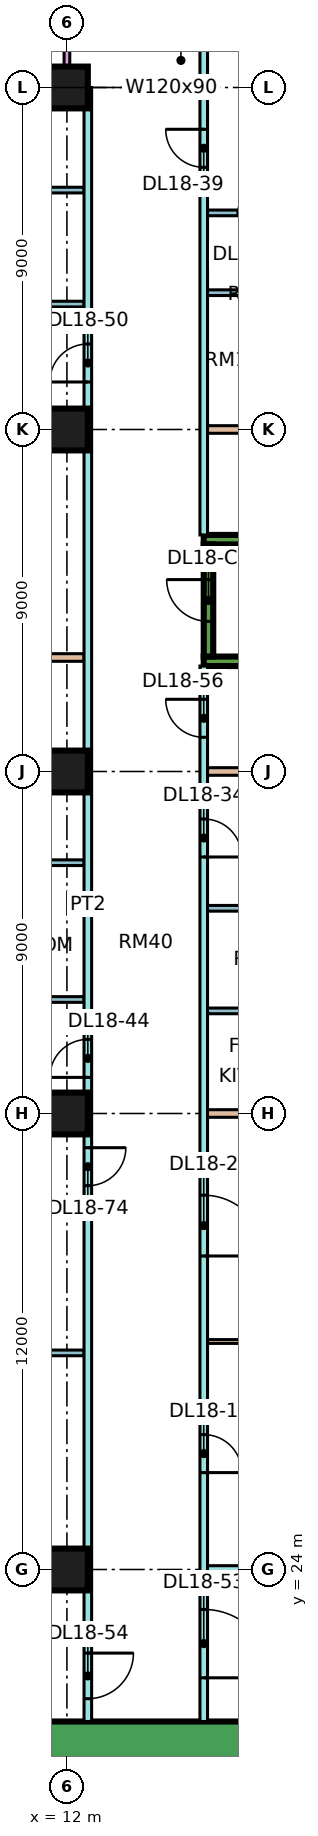
"""IFC4 building model, lengths in metres.
Left out: names, types, materials, properties, quantities, classifications, styles, units other than length and angle.
Written with IfcOpenShell. Run it as: python <this file> out.ifc"""

import sys

from ifc_helpers import new_model, si_unit, direction, frame, frame_2d, origin, origin_2d, place, context, subcontext, project, spatial, rectangle, extrude, element, fill, save


model = new_model("IFC4")
c1 = context("Model", 3, precision=1e-05, world=origin(), true_north=direction((0.0, 1.0)))
c2 = subcontext(c1, "Body", "Model", "MODEL_VIEW")
j1 = project(units=[si_unit("LENGTHUNIT", "METRE"), si_unit("PLANEANGLEUNIT", "RADIAN")], contexts=[c1])
p1 = place(None, origin())
s1 = spatial("IfcSite", under=j1, at=p1, CompositionType="ELEMENT")
p2 = place(p1, origin())
s2 = spatial("IfcBuilding", under=s1, at=p2, CompositionType="ELEMENT")
p3 = place(p2, frame((0.0, 0.0, 82.65)))
s3 = spatial("IfcBuildingStorey", under=s2, at=p3, CompositionType="ELEMENT", Elevation=82.65)
for number, where, z_axis, x_axis in (
    (1, (12.0, 24.0, 0.0), (0.0, 0.0, 1.0), (1.0, 0.0, 0.0)),
    (2, (12.0, 36.0, 0.0), (0.0, 0.0, 1.0), (1.0, 0.0, 0.0)),
    (3, (12.0, 45.0, 0.0), (0.0, 0.0, 1.0), (1.0, 0.0, 0.0)),
    (4, (12.0, 54.0, 0.0), (0.0, 0.0, 1.0), (1.0, 0.0, 0.0)),
    (5, (12.0, 63.0, 0.0), (0.0, 0.0, 1.0), (1.0, 0.0, 0.0)),
):
    element("IfcColumn", number, at=place(p3, frame(where, z_axis=z_axis, x_axis=x_axis)), inside=s3, PredefinedType="COLUMN", context=c2, shape_type="SweptSolid", body=[
        extrude(rectangle(XDim=1.1, YDim=1.1, at=origin_2d()), origin(), (0.0, 0.0, 1.0), 3.75),
    ])
p4 = place(p3, frame((9.0, 19.45, 0.0), z_axis=(0.0, 0.0, 1.0), x_axis=(1.0, 0.0, 0.0)))
e6 = element("IfcWall", 6, at=p4, inside=s3, PredefinedType="SHEAR", context=c2, shape_type="SweptSolid", body=[
    extrude(rectangle(XDim=25.0, YDim=1.1, at=frame_2d((12.5, 0.0))), origin(), (0.0, 0.0, 1.0), 3.75),
])
p5 = place(p4, frame((19.1, 0.0, 0.0)))
e7 = element("IfcOpeningElement", 7, at=p5, cuts=e6, PredefinedType="OPENING", context=c2, shape_type="SweptSolid", body=[
    extrude(rectangle(XDim=1.8, YDim=2.4, at=frame_2d((0.9, 1.2))), frame((0.0, 0.56, 0.0), z_axis=(0.0, -1.0, 0.0), x_axis=(1.0, 0.0, 0.0)), (0.0, 0.0, 1.0), 1.12),
])
for number, where, z_axis, x_axis in (
    (8, (15.6, 47.9, 0.0), (0.0, 0.0, 1.0), (1.0, 0.0, 0.0)),
    (9, (15.6, 51.1, 0.0), (0.0, 0.0, 1.0), (1.0, 0.0, 0.0)),
):
    element("IfcWall", number, at=place(p3, frame(where, z_axis=z_axis, x_axis=x_axis)), inside=s3, PredefinedType="SHEAR", context=c2, shape_type="SweptSolid", body=[
        extrude(rectangle(XDim=7.0, YDim=0.25, at=frame_2d((3.5, 0.0))), origin(), (0.0, 0.0, 1.0), 3.75),
    ])
p6 = place(p3, frame((15.725, 48.025, 0.0), z_axis=(0.0, 0.0, 1.0), x_axis=(0.0, 1.0, 0.0)))
e10 = element("IfcWall", 10, at=p6, inside=s3, PredefinedType="SHEAR", context=c2, shape_type="SweptSolid", body=[
    extrude(rectangle(XDim=2.95, YDim=0.25, at=frame_2d((1.475, 0.0))), origin(), (0.0, 0.0, 1.0), 3.75),
])
p7 = place(p6, frame((0.925, 0.0, 0.0)))
e11 = element("IfcOpeningElement", 11, at=p7, cuts=e10, PredefinedType="OPENING", context=c2, shape_type="SweptSolid", body=[
    extrude(rectangle(XDim=1.1, YDim=2.2, at=frame_2d((0.55, 1.1))), frame((0.0, 0.135, 0.0), z_axis=(0.0, -1.0, 0.0), x_axis=(1.0, 0.0, 0.0)), (0.0, 0.0, 1.0), 0.27),
])
p8 = place(p3, frame((11.925, 63.0, 0.0), z_axis=(0.0, 0.0, 1.0), x_axis=(-1.0, 0.0, 0.0)))
e12 = element("IfcWall", 12, at=p8, inside=s3, PredefinedType="SOLIDWALL", context=c2, shape_type="SweptSolid", body=[
    extrude(rectangle(XDim=10.35, YDim=0.15, at=frame_2d((5.175, 0.0))), origin(), (0.0, 0.0, 1.0), 3.3),
])
p9 = place(p8, frame((1.775, 0.0, 1.7)))
e13 = element("IfcOpeningElement", 13, at=p9, cuts=e12, PredefinedType="OPENING", context=c2, shape_type="SweptSolid", body=[
    extrude(rectangle(XDim=1.2, YDim=0.9, at=frame_2d((0.6, 0.45))), frame((0.0, 0.085, 0.0), z_axis=(0.0, -1.0, 0.0), x_axis=(1.0, 0.0, 0.0)), (0.0, 0.0, 1.0), 0.17),
])
p10 = place(p8, frame((6.962, 0.0, 0.0)))
e14 = element("IfcOpeningElement", 14, at=p10, cuts=e12, PredefinedType="OPENING", context=c2, shape_type="SweptSolid", body=[
    extrude(rectangle(XDim=1.8, YDim=2.4, at=frame_2d((0.9, 1.2))), frame((0.0, 0.085, 0.0), z_axis=(0.0, -1.0, 0.0), x_axis=(1.0, 0.0, 0.0)), (0.0, 0.0, 1.0), 0.17),
])
p11 = place(p3, frame((12.0, 64.5, 0.0), z_axis=(0.0, 0.0, 1.0), x_axis=(0.0, -1.0, 0.0)))
e15 = element("IfcWall", 15, at=p11, inside=s3, PredefinedType="SOLIDWALL", context=c2, shape_type="SweptSolid", body=[
    extrude(rectangle(XDim=1.5, YDim=0.15, at=frame_2d((0.75, 0.0))), origin(), (0.0, 0.0, 1.0), 3.3),
])
p12 = place(p3, frame((-1.35, 22.4, 0.0), z_axis=(0.0, 0.0, 1.0), x_axis=(1.0, 0.0, 0.0)))
e16 = element("IfcWall", 16, at=p12, inside=s3, PredefinedType="PARTITIONING", context=c2, shape_type="SweptSolid", body=[
    extrude(rectangle(XDim=13.8, YDim=0.2, at=frame_2d((6.9, 0.0))), origin(), (0.0, 0.0, 1.0), 3.3),
])
p13 = place(p3, frame((0.0, 36.0, 0.0), z_axis=(0.0, 0.0, 1.0), x_axis=(1.0, 0.0, 0.0)))
e17 = element("IfcWall", 17, at=p13, inside=s3, PredefinedType="PARTITIONING", context=c2, shape_type="SweptSolid", body=[
    extrude(rectangle(XDim=12.45, YDim=0.2, at=frame_2d((6.225, 0.0))), origin(), (0.0, 0.0, 1.0), 3.3),
])
p14 = place(p3, frame((0.0, 48.0, 0.0), z_axis=(0.0, 0.0, 1.0), x_axis=(1.0, 0.0, 0.0)))
e18 = element("IfcWall", 18, at=p14, inside=s3, PredefinedType="PARTITIONING", context=c2, shape_type="SweptSolid", body=[
    extrude(rectangle(XDim=12.45, YDim=0.2, at=frame_2d((6.225, 0.0))), origin(), (0.0, 0.0, 1.0), 3.3),
])
for number, where, z_axis, x_axis in (
    (19, (7.225, 29.7, 0.0), (0.0, 0.0, 1.0), (1.0, 0.0, 0.0)),
    (20, (7.225, 33.3, 0.0), (0.0, 0.0, 1.0), (1.0, 0.0, 0.0)),
):
    element("IfcWall", number, at=place(p3, frame(where, z_axis=z_axis, x_axis=x_axis)), inside=s3, PredefinedType="PARTITIONING", context=c2, shape_type="SweptSolid", body=[
        extrude(rectangle(XDim=5.225, YDim=0.15, at=frame_2d((2.612, 0.0))), origin(), (0.0, 0.0, 1.0), 3.3),
    ])
p15 = place(p3, frame((7.8, 54.3, 0.0), z_axis=(0.0, 0.0, 1.0), x_axis=(1.0, 0.0, 0.0)))
e21 = element("IfcWall", 21, at=p15, inside=s3, PredefinedType="PARTITIONING", context=c2, shape_type="SweptSolid", body=[
    extrude(rectangle(XDim=4.65, YDim=0.1, at=frame_2d((2.325, 0.0))), origin(), (0.0, 0.0, 1.0), 3.3),
])
for number, where, z_axis, x_axis in (
    (22, (7.825, 57.3, 0.0), (0.0, 0.0, 1.0), (1.0, 0.0, 0.0)),
    (23, (7.825, 60.3, 0.0), (0.0, 0.0, 1.0), (1.0, 0.0, 0.0)),
):
    element("IfcWall", number, at=place(p3, frame(where, z_axis=z_axis, x_axis=x_axis)), inside=s3, PredefinedType="PARTITIONING", context=c2, shape_type="SweptSolid", body=[
        extrude(rectangle(XDim=4.625, YDim=0.15, at=frame_2d((2.312, 0.0))), origin(), (0.0, 0.0, 1.0), 3.3),
    ])
p16 = place(p3, frame((8.425, 39.0, 0.0), z_axis=(0.0, 0.0, 1.0), x_axis=(1.0, 0.0, 0.0)))
e24 = element("IfcWall", 24, at=p16, inside=s3, PredefinedType="PARTITIONING", context=c2, shape_type="SweptSolid", body=[
    extrude(rectangle(XDim=4.025, YDim=0.15, at=frame_2d((2.012, 0.0))), origin(), (0.0, 0.0, 1.0), 3.3),
])
p17 = place(p16, frame((1.675, 0.0, 0.0)))
e25 = element("IfcOpeningElement", 25, at=p17, cuts=e24, PredefinedType="OPENING", context=c2, shape_type="SweptSolid", body=[
    extrude(rectangle(XDim=0.8, YDim=2.1, at=frame_2d((0.4, 1.05))), frame((0.0, 0.085, 0.0), z_axis=(0.0, -1.0, 0.0), x_axis=(1.0, 0.0, 0.0)), (0.0, 0.0, 1.0), 0.17),
])
p18 = place(p3, frame((8.425, 42.6, 0.0), z_axis=(0.0, 0.0, 1.0), x_axis=(1.0, 0.0, 0.0)))
e26 = element("IfcWall", 26, at=p18, inside=s3, PredefinedType="PARTITIONING", context=c2, shape_type="SweptSolid", body=[
    extrude(rectangle(XDim=4.025, YDim=0.15, at=frame_2d((2.012, 0.0))), origin(), (0.0, 0.0, 1.0), 3.3),
])
p19 = place(p3, frame((12.55, 20.0, 0.0), z_axis=(0.0, 0.0, 1.0), x_axis=(0.0, 1.0, 0.0)))
e27 = element("IfcWall", 27, at=p19, inside=s3, PredefinedType="PARTITIONING", context=c2, shape_type="SweptSolid", body=[
    extrude(rectangle(XDim=43.0, YDim=0.2, at=frame_2d((21.5, 0.0))), origin(), (0.0, 0.0, 1.0), 3.3),
])
p20 = place(p19, frame((16.95, 0.0, 0.0)))
e28 = element("IfcOpeningElement", 28, at=p20, cuts=e27, PredefinedType="OPENING", context=c2, shape_type="SweptSolid", body=[
    extrude(rectangle(XDim=1.0, YDim=2.1, at=frame_2d((0.5, 1.05))), frame((0.0, 0.11, 0.0), z_axis=(0.0, -1.0, 0.0), x_axis=(1.0, 0.0, 0.0)), (0.0, 0.0, 1.0), 0.22),
])
p21 = place(p19, frame((35.25, 0.0, 0.0)))
e29 = element("IfcOpeningElement", 29, at=p21, cuts=e27, PredefinedType="OPENING", context=c2, shape_type="SweptSolid", body=[
    extrude(rectangle(XDim=1.0, YDim=2.1, at=frame_2d((0.5, 1.05))), frame((0.0, 0.11, 0.0), z_axis=(0.0, -1.0, 0.0), x_axis=(1.0, 0.0, 0.0)), (0.0, 0.0, 1.0), 0.22),
])
p22 = place(p19, frame((0.6, 0.0, 0.0)))
e30 = element("IfcOpeningElement", 30, at=p22, cuts=e27, PredefinedType="OPENING", context=c2, shape_type="SweptSolid", body=[
    extrude(rectangle(XDim=1.2, YDim=2.1, at=frame_2d((0.6, 1.05))), frame((0.0, 0.11, 0.0), z_axis=(0.0, -1.0, 0.0), x_axis=(1.0, 0.0, 0.0)), (0.0, 0.0, 1.0), 0.22),
])
p23 = place(p19, frame((14.1, 0.0, 0.0)))
e31 = element("IfcOpeningElement", 31, at=p23, cuts=e27, PredefinedType="OPENING", context=c2, shape_type="SweptSolid", body=[
    extrude(rectangle(XDim=1.0, YDim=2.1, at=frame_2d((0.5, 1.05))), frame((0.0, 0.11, 0.0), z_axis=(0.0, -1.0, 0.0), x_axis=(1.0, 0.0, 0.0)), (0.0, 0.0, 1.0), 0.22),
])
p24 = place(p3, frame((15.6, 20.0, 0.0), z_axis=(0.0, 0.0, 1.0), x_axis=(0.0, 1.0, 0.0)))
e32 = element("IfcWall", 32, at=p24, inside=s3, PredefinedType="PARTITIONING", context=c2, shape_type="SweptSolid", body=[
    extrude(rectangle(XDim=27.775, YDim=0.2, at=frame_2d((13.887, 0.0))), origin(), (0.0, 0.0, 1.0), 3.3),
])
p25 = place(p24, frame((6.55, 0.0, 0.0)))
e33 = element("IfcOpeningElement", 33, at=p25, cuts=e32, PredefinedType="OPENING", context=c2, shape_type="SweptSolid", body=[
    extrude(rectangle(XDim=1.0, YDim=2.1, at=frame_2d((0.5, 1.05))), frame((0.0, 0.11, 0.0), z_axis=(0.0, -1.0, 0.0), x_axis=(1.0, 0.0, 0.0)), (0.0, 0.0, 1.0), 0.22),
])
p26 = place(p24, frame((12.25, 0.0, 0.0)))
e34 = element("IfcOpeningElement", 34, at=p26, cuts=e32, PredefinedType="OPENING", context=c2, shape_type="SweptSolid", body=[
    extrude(rectangle(XDim=1.6, YDim=2.1, at=frame_2d((0.8, 1.05))), frame((0.0, 0.11, 0.0), z_axis=(0.0, -1.0, 0.0), x_axis=(1.0, 0.0, 0.0)), (0.0, 0.0, 1.0), 0.22),
])
p27 = place(p24, frame((22.75, 0.0, 0.0)))
e35 = element("IfcOpeningElement", 35, at=p27, cuts=e32, PredefinedType="OPENING", context=c2, shape_type="SweptSolid", body=[
    extrude(rectangle(XDim=1.0, YDim=2.1, at=frame_2d((0.5, 1.05))), frame((0.0, 0.11, 0.0), z_axis=(0.0, -1.0, 0.0), x_axis=(1.0, 0.0, 0.0)), (0.0, 0.0, 1.0), 0.22),
])
p28 = place(p24, frame((1.15, 0.0, 0.0)))
e36 = element("IfcOpeningElement", 36, at=p28, cuts=e32, PredefinedType="OPENING", context=c2, shape_type="SweptSolid", body=[
    extrude(rectangle(XDim=1.8, YDim=2.1, at=frame_2d((0.9, 1.05))), frame((0.0, 0.11, 0.0), z_axis=(0.0, -1.0, 0.0), x_axis=(1.0, 0.0, 0.0)), (0.0, 0.0, 1.0), 0.22),
])
p29 = place(p24, frame((25.9, 0.0, 0.0)))
e37 = element("IfcOpeningElement", 37, at=p29, cuts=e32, PredefinedType="OPENING", context=c2, shape_type="SweptSolid", body=[
    extrude(rectangle(XDim=1.0, YDim=2.1, at=frame_2d((0.5, 1.05))), frame((0.0, 0.11, 0.0), z_axis=(0.0, -1.0, 0.0), x_axis=(1.0, 0.0, 0.0)), (0.0, 0.0, 1.0), 0.22),
])
p30 = place(p3, frame((15.6, 51.225, 0.0), z_axis=(0.0, 0.0, 1.0), x_axis=(0.0, 1.0, 0.0)))
e38 = element("IfcWall", 38, at=p30, inside=s3, PredefinedType="PARTITIONING", context=c2, shape_type="SweptSolid", body=[
    extrude(rectangle(XDim=13.125, YDim=0.2, at=frame_2d((6.562, 0.0))), origin(), (0.0, 0.0, 1.0), 3.3),
])
p31 = place(p30, frame((9.675, 0.0, 0.0)))
e39 = element("IfcOpeningElement", 39, at=p31, cuts=e38, PredefinedType="OPENING", context=c2, shape_type="SweptSolid", body=[
    extrude(rectangle(XDim=1.0, YDim=2.1, at=frame_2d((0.5, 1.05))), frame((0.0, 0.11, 0.0), z_axis=(0.0, -1.0, 0.0), x_axis=(1.0, 0.0, 0.0)), (0.0, 0.0, 1.0), 0.22),
])
p32 = place(p3, frame((15.7, 24.0, 0.0), z_axis=(0.0, 0.0, 1.0), x_axis=(1.0, 0.0, 0.0)))
e40 = element("IfcWall", 40, at=p32, inside=s3, PredefinedType="PARTITIONING", context=c2, shape_type="SweptSolid", body=[
    extrude(rectangle(XDim=5.8, YDim=0.2, at=frame_2d((2.9, 0.0))), origin(), (0.0, 0.0, 1.0), 3.3),
])
p33 = place(p3, frame((15.7, 30.0, 0.0), z_axis=(0.0, 0.0, 1.0), x_axis=(1.0, 0.0, 0.0)))
e41 = element("IfcWall", 41, at=p33, inside=s3, PredefinedType="PARTITIONING", context=c2, shape_type="SweptSolid", body=[
    extrude(rectangle(XDim=5.8, YDim=0.1, at=frame_2d((2.9, 0.0))), origin(), (0.0, 0.0, 1.0), 3.3),
])
p34 = place(p3, frame((15.7, 36.0, 0.0), z_axis=(0.0, 0.0, 1.0), x_axis=(1.0, 0.0, 0.0)))
e42 = element("IfcWall", 42, at=p34, inside=s3, PredefinedType="PARTITIONING", context=c2, shape_type="SweptSolid", body=[
    extrude(rectangle(XDim=8.3, YDim=0.2, at=frame_2d((4.15, 0.0))), origin(), (0.0, 0.0, 1.0), 3.3),
])
for number, where, z_axis, x_axis in (
    (43, (15.7, 38.7, 0.0), (0.0, 0.0, 1.0), (1.0, 0.0, 0.0)),
    (44, (15.7, 41.4, 0.0), (0.0, 0.0, 1.0), (1.0, 0.0, 0.0)),
):
    element("IfcWall", number, at=place(p3, frame(where, z_axis=z_axis, x_axis=x_axis)), inside=s3, PredefinedType="PARTITIONING", context=c2, shape_type="SweptSolid", body=[
        extrude(rectangle(XDim=2.825, YDim=0.15, at=frame_2d((1.413, 0.0))), origin(), (0.0, 0.0, 1.0), 3.3),
    ])
p35 = place(p3, frame((15.7, 45.0, 0.0), z_axis=(0.0, 0.0, 1.0), x_axis=(1.0, 0.0, 0.0)))
e45 = element("IfcWall", 45, at=p35, inside=s3, PredefinedType="PARTITIONING", context=c2, shape_type="SweptSolid", body=[
    extrude(rectangle(XDim=8.3, YDim=0.2, at=frame_2d((4.15, 0.0))), origin(), (0.0, 0.0, 1.0), 3.3),
])
p36 = place(p3, frame((15.7, 54.0, 0.0), z_axis=(0.0, 0.0, 1.0), x_axis=(1.0, 0.0, 0.0)))
e46 = element("IfcWall", 46, at=p36, inside=s3, PredefinedType="PARTITIONING", context=c2, shape_type="SweptSolid", body=[
    extrude(rectangle(XDim=8.226, YDim=0.2, at=frame_2d((4.113, 0.0))), origin(), (0.0, 0.0, 1.0), 3.3),
])
p37 = place(p3, frame((15.7, 57.6, 0.0), z_axis=(0.0, 0.0, 1.0), x_axis=(1.0, 0.0, 0.0)))
e47 = element("IfcWall", 47, at=p37, inside=s3, PredefinedType="PARTITIONING", context=c2, shape_type="SweptSolid", body=[
    extrude(rectangle(XDim=2.525, YDim=0.15, at=frame_2d((1.263, 0.0))), origin(), (0.0, 0.0, 1.0), 3.3),
])
p38 = place(p3, frame((15.7, 59.7, 0.0), z_axis=(0.0, 0.0, 1.0), x_axis=(1.0, 0.0, 0.0)))
e48 = element("IfcWall", 48, at=p38, inside=s3, PredefinedType="PARTITIONING", context=c2, shape_type="SweptSolid", body=[
    extrude(rectangle(XDim=2.525, YDim=0.15, at=frame_2d((1.263, 0.0))), origin(), (0.0, 0.0, 1.0), 3.3),
])
p39 = place(p38, frame((0.8, 0.0, 0.0)))
e49 = element("IfcOpeningElement", 49, at=p39, cuts=e48, PredefinedType="OPENING", context=c2, shape_type="SweptSolid", body=[
    extrude(rectangle(XDim=0.8, YDim=2.1, at=frame_2d((0.4, 1.05))), frame((0.0, 0.085, 0.0), z_axis=(0.0, -1.0, 0.0), x_axis=(1.0, 0.0, 0.0)), (0.0, 0.0, 1.0), 0.17),
])
p40 = place(p7, frame((1.1, 0.0, 0.0), z_axis=(0.0, 0.0, 1.0), x_axis=(-1.0, 0.0, 0.0)))
e50 = element("IfcDoor", 50, at=p40, inside=s3, OperationType="SINGLE_SWING_RIGHT", PredefinedType="DOOR", context=c2, shape_type="SweptSolid", body=[
    extrude(rectangle(XDim=1.1, YDim=2.2, at=frame_2d((0.55, 1.1))), frame((0.0, 0.025, 0.0), z_axis=(0.0, -1.0, 0.0), x_axis=(1.0, 0.0, 0.0)), (0.0, 0.0, 1.0), 0.05),
])
fill(e11, e50)
p41 = place(p25, frame((1.0, 0.0, 0.0), z_axis=(0.0, 0.0, 1.0), x_axis=(-1.0, 0.0, 0.0)))
e51 = element("IfcDoor", 51, at=p41, inside=s3, OperationType="SINGLE_SWING_LEFT", PredefinedType="DOOR", context=c2, shape_type="SweptSolid", body=[
    extrude(rectangle(XDim=1.0, YDim=2.1, at=frame_2d((0.5, 1.05))), frame((0.0, 0.025, 0.0), z_axis=(0.0, -1.0, 0.0), x_axis=(1.0, 0.0, 0.0)), (0.0, 0.0, 1.0), 0.05),
])
fill(e33, e51)
p42 = place(p26, frame((1.6, 0.0, 0.0), z_axis=(0.0, 0.0, 1.0), x_axis=(-1.0, 0.0, 0.0)))
e52 = element("IfcDoor", 52, at=p42, inside=s3, OperationType="DOUBLE_DOOR_SINGLE_SWING", PredefinedType="DOOR", context=c2, shape_type="SweptSolid", body=[
    extrude(rectangle(XDim=1.6, YDim=2.1, at=frame_2d((0.8, 1.05))), frame((0.0, 0.025, 0.0), z_axis=(0.0, -1.0, 0.0), x_axis=(1.0, 0.0, 0.0)), (0.0, 0.0, 1.0), 0.05),
])
fill(e34, e52)
p43 = place(p27, frame((1.0, 0.0, 0.0), z_axis=(0.0, 0.0, 1.0), x_axis=(-1.0, 0.0, 0.0)))
e53 = element("IfcDoor", 53, at=p43, inside=s3, OperationType="SINGLE_SWING_LEFT", PredefinedType="DOOR", context=c2, shape_type="SweptSolid", body=[
    extrude(rectangle(XDim=1.0, YDim=2.1, at=frame_2d((0.5, 1.05))), frame((0.0, 0.025, 0.0), z_axis=(0.0, -1.0, 0.0), x_axis=(1.0, 0.0, 0.0)), (0.0, 0.0, 1.0), 0.05),
])
fill(e35, e53)
p44 = place(p39, frame((0.8, 0.0, 0.0), z_axis=(0.0, 0.0, 1.0), x_axis=(-1.0, 0.0, 0.0)))
e54 = element("IfcDoor", 54, at=p44, inside=s3, OperationType="SINGLE_SWING_RIGHT", PredefinedType="DOOR", context=c2, shape_type="SweptSolid", body=[
    extrude(rectangle(XDim=0.8, YDim=2.1, at=frame_2d((0.4, 1.05))), frame((0.0, 0.025, 0.0), z_axis=(0.0, -1.0, 0.0), x_axis=(1.0, 0.0, 0.0)), (0.0, 0.0, 1.0), 0.05),
])
fill(e49, e54)
p45 = place(p31, frame((1.0, 0.0, 0.0), z_axis=(0.0, 0.0, 1.0), x_axis=(-1.0, 0.0, 0.0)))
e55 = element("IfcDoor", 55, at=p45, inside=s3, OperationType="SINGLE_SWING_RIGHT", PredefinedType="DOOR", context=c2, shape_type="SweptSolid", body=[
    extrude(rectangle(XDim=1.0, YDim=2.1, at=frame_2d((0.5, 1.05))), frame((0.0, 0.025, 0.0), z_axis=(0.0, -1.0, 0.0), x_axis=(1.0, 0.0, 0.0)), (0.0, 0.0, 1.0), 0.05),
])
fill(e39, e55)
p46 = place(p20, origin())
e56 = element("IfcDoor", 56, at=p46, inside=s3, OperationType="SINGLE_SWING_LEFT", PredefinedType="DOOR", context=c2, shape_type="SweptSolid", body=[
    extrude(rectangle(XDim=1.0, YDim=2.1, at=frame_2d((0.5, 1.05))), frame((0.0, 0.025, 0.0), z_axis=(0.0, -1.0, 0.0), x_axis=(1.0, 0.0, 0.0)), (0.0, 0.0, 1.0), 0.05),
])
fill(e28, e56)
p47 = place(p21, origin())
e57 = element("IfcDoor", 57, at=p47, inside=s3, OperationType="SINGLE_SWING_LEFT", PredefinedType="DOOR", context=c2, shape_type="SweptSolid", body=[
    extrude(rectangle(XDim=1.0, YDim=2.1, at=frame_2d((0.5, 1.05))), frame((0.0, 0.025, 0.0), z_axis=(0.0, -1.0, 0.0), x_axis=(1.0, 0.0, 0.0)), (0.0, 0.0, 1.0), 0.05),
])
fill(e29, e57)
p48 = place(p28, frame((1.8, 0.0, 0.0), z_axis=(0.0, 0.0, 1.0), x_axis=(-1.0, 0.0, 0.0)))
e58 = element("IfcDoor", 58, at=p48, inside=s3, OperationType="DOUBLE_DOOR_SINGLE_SWING", PredefinedType="DOOR", context=c2, shape_type="SweptSolid", body=[
    extrude(rectangle(XDim=1.8, YDim=2.1, at=frame_2d((0.9, 1.05))), frame((0.0, 0.025, 0.0), z_axis=(0.0, -1.0, 0.0), x_axis=(1.0, 0.0, 0.0)), (0.0, 0.0, 1.0), 0.05),
])
fill(e36, e58)
p49 = place(p22, origin())
e59 = element("IfcDoor", 59, at=p49, inside=s3, OperationType="SINGLE_SWING_RIGHT", PredefinedType="DOOR", context=c2, shape_type="SweptSolid", body=[
    extrude(rectangle(XDim=1.2, YDim=2.1, at=frame_2d((0.6, 1.05))), frame((0.0, 0.025, 0.0), z_axis=(0.0, -1.0, 0.0), x_axis=(1.0, 0.0, 0.0)), (0.0, 0.0, 1.0), 0.05),
])
fill(e30, e59)
p50 = place(p29, frame((1.0, 0.0, 0.0), z_axis=(0.0, 0.0, 1.0), x_axis=(-1.0, 0.0, 0.0)))
e60 = element("IfcDoor", 60, at=p50, inside=s3, OperationType="SINGLE_SWING_RIGHT", PredefinedType="DOOR", context=c2, shape_type="SweptSolid", body=[
    extrude(rectangle(XDim=1.0, YDim=2.1, at=frame_2d((0.5, 1.05))), frame((0.0, 0.025, 0.0), z_axis=(0.0, -1.0, 0.0), x_axis=(1.0, 0.0, 0.0)), (0.0, 0.0, 1.0), 0.05),
])
fill(e37, e60)
p51 = place(p23, origin())
e61 = element("IfcDoor", 61, at=p51, inside=s3, OperationType="SINGLE_SWING_RIGHT", PredefinedType="DOOR", context=c2, shape_type="SweptSolid", body=[
    extrude(rectangle(XDim=1.0, YDim=2.1, at=frame_2d((0.5, 1.05))), frame((0.0, 0.025, 0.0), z_axis=(0.0, -1.0, 0.0), x_axis=(1.0, 0.0, 0.0)), (0.0, 0.0, 1.0), 0.05),
])
fill(e31, e61)
save(model, sys.argv[1])
